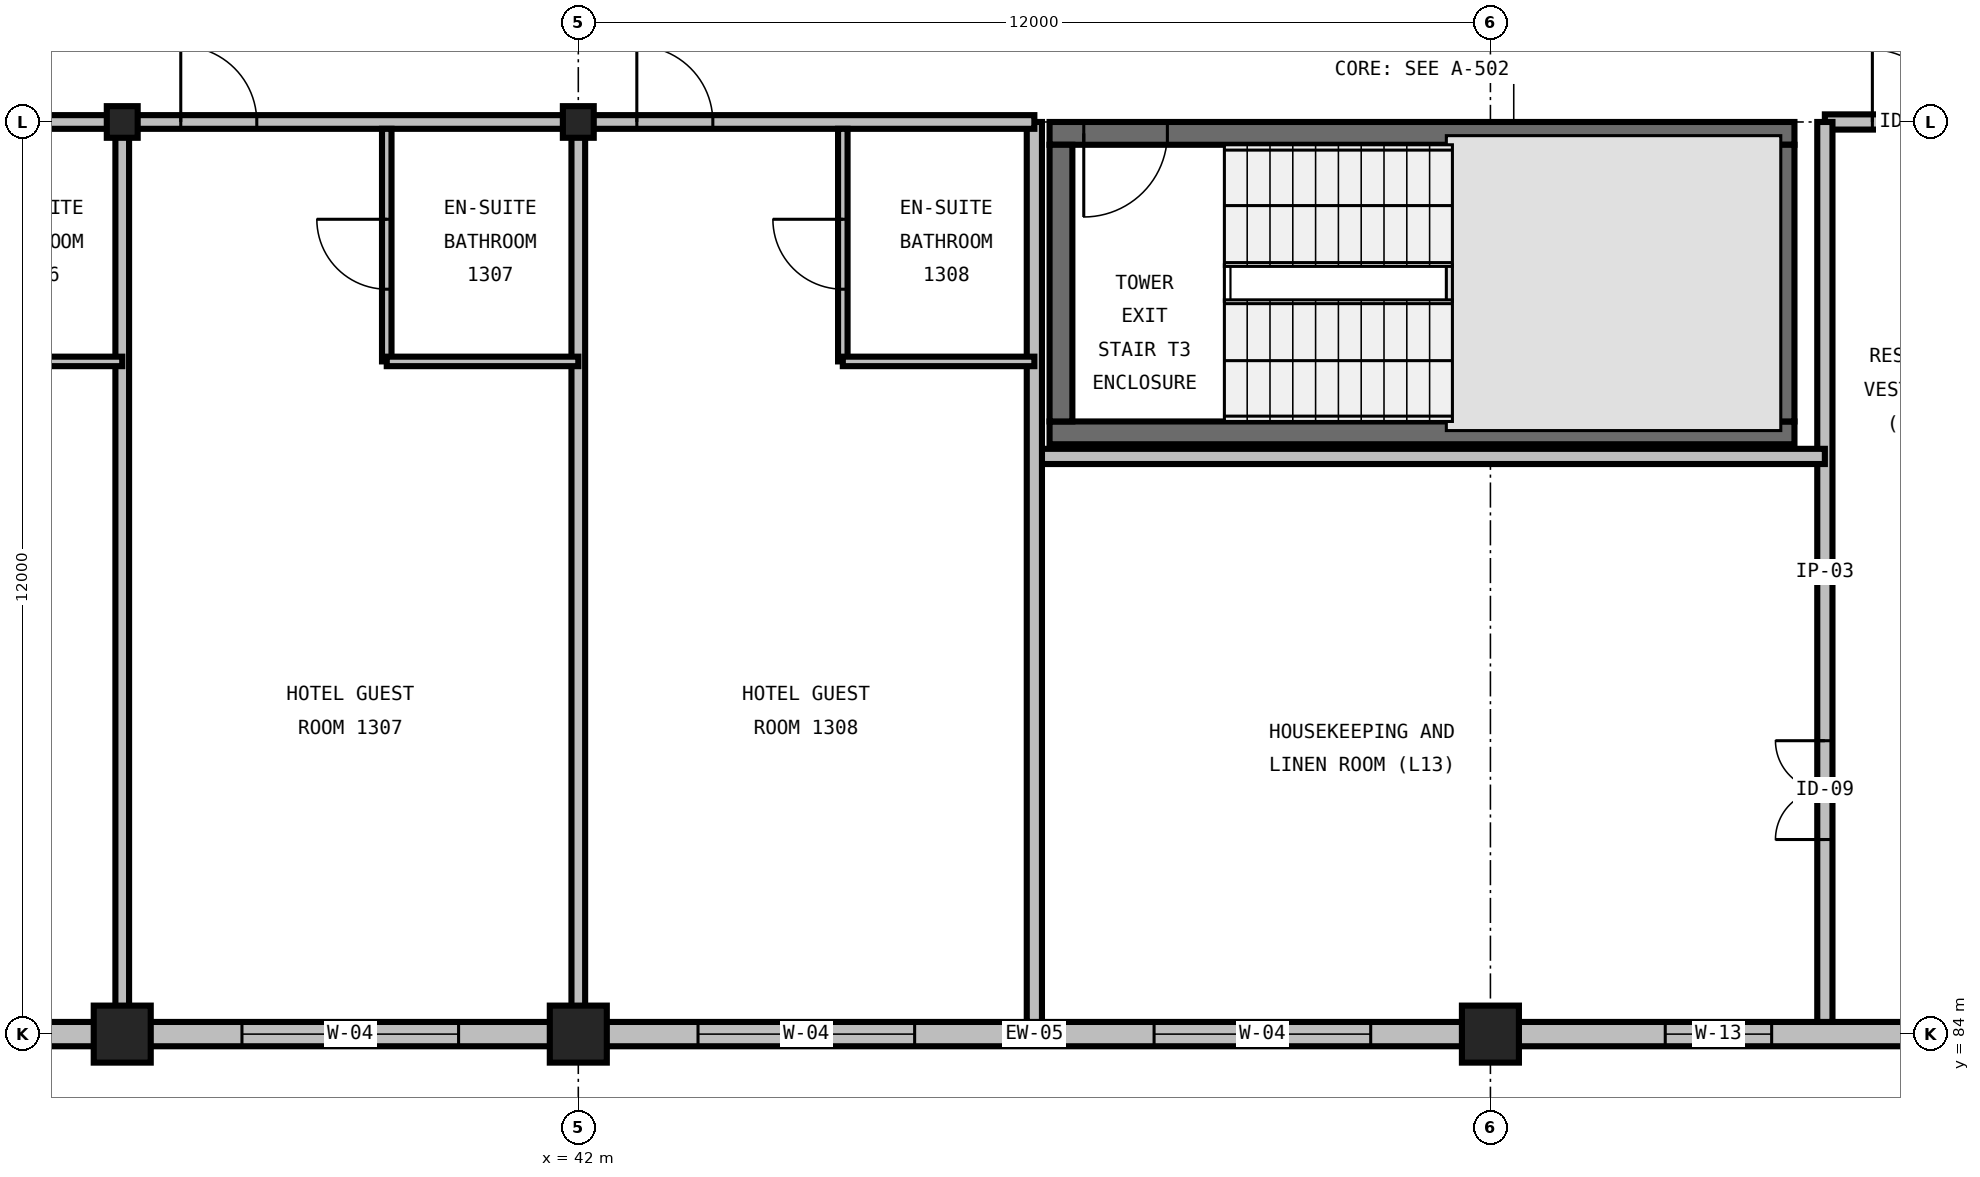
"""IFC4 building model, lengths in metres.
Left out: names, types, materials, properties, quantities, classifications, styles, units other than length and angle.
Written with IfcOpenShell. Run it as: python <this file> out.ifc"""

import sys

from ifc_helpers import new_model, si_unit, direction, frame, frame_2d, origin, origin_2d, place, context, subcontext, project, spatial, rectangle, i_section, extrude, element, fill, save


model = new_model("IFC4")
c1 = context("Model", 3, precision=1e-05, world=origin(), true_north=direction((0.0, 1.0)))
c2 = subcontext(c1, "Body", "Model", "MODEL_VIEW")
j1 = project(units=[si_unit("LENGTHUNIT", "METRE"), si_unit("PLANEANGLEUNIT", "RADIAN")], contexts=[c1])
p1 = place(None, origin())
s1 = spatial("IfcSite", under=j1, at=p1, CompositionType="ELEMENT")
p2 = place(p1, origin())
s2 = spatial("IfcBuilding", under=s1, at=p2, CompositionType="ELEMENT")
p3 = place(p2, frame((0.0, 0.0, 56.4)))
s3 = spatial("IfcBuildingStorey", under=s2, at=p3, CompositionType="ELEMENT", Elevation=56.4)
p4 = place(p3, frame((36.0, 84.0, 0.0), z_axis=(0.0, 0.0, 1.0), x_axis=(1.0, 0.0, 0.0)))
e1 = element("IfcColumn", 1, at=p4, inside=s3, PredefinedType="COLUMN", context=c2, shape_type="SweptSolid", body=[
    extrude(rectangle(XDim=0.75, YDim=0.75, at=origin_2d()), origin(), (0.0, 0.0, 1.0), 3.6),
])
p5 = place(p3, frame((36.0, 96.0, 0.0), z_axis=(0.0, 0.0, 1.0), x_axis=(1.0, 0.0, 0.0)))
e2 = element("IfcColumn", 2, at=p5, inside=s3, PredefinedType="COLUMN", context=c2, shape_type="SweptSolid", body=[
    extrude(i_section(OverallWidth=0.406, OverallDepth=0.416, WebThickness=0.03, FlangeThickness=0.048, FilletRadius=0.031, at=origin_2d()), origin(), (0.0, 0.0, 1.0), 3.6),
])
p6 = place(p3, frame((42.0, 84.0, 0.0), z_axis=(0.0, 0.0, 1.0), x_axis=(1.0, 0.0, 0.0)))
e3 = element("IfcColumn", 3, at=p6, inside=s3, PredefinedType="COLUMN", context=c2, shape_type="SweptSolid", body=[
    extrude(rectangle(XDim=0.75, YDim=0.75, at=origin_2d()), origin(), (0.0, 0.0, 1.0), 3.6),
])
p7 = place(p3, frame((42.0, 96.0, 0.0), z_axis=(0.0, 0.0, 1.0), x_axis=(1.0, 0.0, 0.0)))
e4 = element("IfcColumn", 4, at=p7, inside=s3, PredefinedType="COLUMN", context=c2, shape_type="SweptSolid", body=[
    extrude(i_section(OverallWidth=0.406, OverallDepth=0.416, WebThickness=0.03, FlangeThickness=0.048, FilletRadius=0.031, at=origin_2d()), origin(), (0.0, 0.0, 1.0), 3.6),
])
p8 = place(p3, frame((54.0, 84.0, 0.0), z_axis=(0.0, 0.0, 1.0), x_axis=(1.0, 0.0, 0.0)))
e5 = element("IfcColumn", 5, at=p8, inside=s3, PredefinedType="COLUMN", context=c2, shape_type="SweptSolid", body=[
    extrude(rectangle(XDim=0.75, YDim=0.75, at=origin_2d()), origin(), (0.0, 0.0, 1.0), 3.6),
])
p9 = place(p3, frame((48.2, 91.91, 0.0), z_axis=(0.0, 0.0, 1.0), x_axis=(1.0, 0.0, 0.0)))
e6 = element("IfcWall", 6, at=p9, inside=s3, PredefinedType="SHEAR", context=c2, shape_type="SweptSolid", body=[
    extrude(rectangle(XDim=9.8, YDim=0.3, at=frame_2d((4.9, 0.0))), origin(), (0.0, 0.0, 1.0), 3.6),
])
p10 = place(p3, frame((58.0, 95.85, 0.0), z_axis=(0.0, 0.0, 1.0), x_axis=(-1.0, 0.0, 0.0)))
e7 = element("IfcWall", 7, at=p10, inside=s3, PredefinedType="SHEAR", context=c2, shape_type="SweptSolid", body=[
    extrude(rectangle(XDim=9.8, YDim=0.3, at=frame_2d((4.9, 0.0))), origin(), (0.0, 0.0, 1.0), 3.6),
])
p11 = place(p10, frame((8.25, 0.0, 0.0)))
e8 = element("IfcOpeningElement", 8, at=p11, cuts=e7, PredefinedType="OPENING", context=c2, shape_type="SweptSolid", body=[
    extrude(rectangle(XDim=1.1, YDim=2.2, at=frame_2d((0.55, 1.1))), frame((0.0, 0.165, 0.0), z_axis=(0.0, -1.0, 0.0), x_axis=(1.0, 0.0, 0.0)), (0.0, 0.0, 1.0), 0.33),
])
for number, where, z_axis, x_axis in (
    (9, (48.35, 95.7, 0.0), (0.0, 0.0, 1.0), (0.0, -1.0, 0.0)),
    (10, (57.85, 92.06, 0.0), (0.0, 0.0, 1.0), (0.0, 1.0, 0.0)),
):
    element("IfcWall", number, at=place(p3, frame(where, z_axis=z_axis, x_axis=x_axis)), inside=s3, PredefinedType="SHEAR", context=c2, shape_type="SweptSolid", body=[
        extrude(rectangle(XDim=3.64, YDim=0.3, at=frame_2d((1.82, 0.0))), origin(), (0.0, 0.0, 1.0), 3.6),
    ])
p12 = place(p3, frame((30.0, 84.0, 0.0), z_axis=(0.0, 0.0, 1.0), x_axis=(1.0, 0.0, 0.0)))
e11 = element("IfcWall", 11, at=p12, inside=s3, PredefinedType="STANDARD", context=c2, shape_type="SweptSolid", body=[
    extrude(rectangle(XDim=6.0, YDim=0.32, at=frame_2d((3.0, 0.0))), origin(), (0.0, 0.0, 1.0), 2.536),
])
p13 = place(p12, frame((1.575, 0.0, 0.7)))
e12 = element("IfcOpeningElement", 12, at=p13, cuts=e11, PredefinedType="OPENING", context=c2, shape_type="SweptSolid", body=[
    extrude(rectangle(XDim=2.85, YDim=1.65, at=frame_2d((1.425, 0.825))), frame((0.0, 0.175, 0.0), z_axis=(0.0, -1.0, 0.0), x_axis=(1.0, 0.0, 0.0)), (0.0, 0.0, 1.0), 0.35),
])
p14 = place(p3, frame((36.0, 84.0, 0.0), z_axis=(0.0, 0.0, 1.0), x_axis=(1.0, 0.0, 0.0)))
e13 = element("IfcWall", 13, at=p14, inside=s3, PredefinedType="STANDARD", context=c2, shape_type="SweptSolid", body=[
    extrude(rectangle(XDim=6.0, YDim=0.32, at=frame_2d((3.0, 0.0))), origin(), (0.0, 0.0, 1.0), 2.536),
])
p15 = place(p14, frame((1.575, 0.0, 0.7)))
e14 = element("IfcOpeningElement", 14, at=p15, cuts=e13, PredefinedType="OPENING", context=c2, shape_type="SweptSolid", body=[
    extrude(rectangle(XDim=2.85, YDim=1.65, at=frame_2d((1.425, 0.825))), frame((0.0, 0.175, 0.0), z_axis=(0.0, -1.0, 0.0), x_axis=(1.0, 0.0, 0.0)), (0.0, 0.0, 1.0), 0.35),
])
p16 = place(p3, frame((42.0, 84.0, 0.0), z_axis=(0.0, 0.0, 1.0), x_axis=(1.0, 0.0, 0.0)))
e15 = element("IfcWall", 15, at=p16, inside=s3, PredefinedType="STANDARD", context=c2, shape_type="SweptSolid", body=[
    extrude(rectangle(XDim=12.0, YDim=0.32, at=frame_2d((6.0, 0.0))), origin(), (0.0, 0.0, 1.0), 2.536),
])
p17 = place(p16, frame((1.575, 0.0, 0.7)))
e16 = element("IfcOpeningElement", 16, at=p17, cuts=e15, PredefinedType="OPENING", context=c2, shape_type="SweptSolid", body=[
    extrude(rectangle(XDim=2.85, YDim=1.65, at=frame_2d((1.425, 0.825))), frame((0.0, 0.175, 0.0), z_axis=(0.0, -1.0, 0.0), x_axis=(1.0, 0.0, 0.0)), (0.0, 0.0, 1.0), 0.35),
])
p18 = place(p16, frame((7.575, 0.0, 0.7)))
e17 = element("IfcOpeningElement", 17, at=p18, cuts=e15, PredefinedType="OPENING", context=c2, shape_type="SweptSolid", body=[
    extrude(rectangle(XDim=2.85, YDim=1.65, at=frame_2d((1.425, 0.825))), frame((0.0, 0.175, 0.0), z_axis=(0.0, -1.0, 0.0), x_axis=(1.0, 0.0, 0.0)), (0.0, 0.0, 1.0), 0.35),
])
p19 = place(p3, frame((54.0, 84.0, 0.0), z_axis=(0.0, 0.0, 1.0), x_axis=(1.0, 0.0, 0.0)))
e18 = element("IfcWall", 18, at=p19, inside=s3, PredefinedType="STANDARD", context=c2, shape_type="SweptSolid", body=[
    extrude(rectangle(XDim=12.0, YDim=0.32, at=frame_2d((6.0, 0.0))), origin(), (0.0, 0.0, 1.0), 2.536),
])
p20 = place(p19, frame((2.3, 0.0, 1.0)))
e19 = element("IfcOpeningElement", 19, at=p20, cuts=e18, PredefinedType="OPENING", context=c2, shape_type="SweptSolid", body=[
    extrude(rectangle(XDim=1.4, YDim=1.4, at=frame_2d((0.7, 0.7))), frame((0.0, 0.175, 0.0), z_axis=(0.0, -1.0, 0.0), x_axis=(1.0, 0.0, 0.0)), (0.0, 0.0, 1.0), 0.35),
])
p21 = place(p19, frame((8.25, 0.0, 1.0)))
e20 = element("IfcOpeningElement", 20, at=p21, cuts=e18, PredefinedType="OPENING", context=c2, shape_type="SweptSolid", body=[
    extrude(rectangle(XDim=1.5, YDim=1.35, at=frame_2d((0.75, 0.675))), frame((0.0, 0.175, 0.0), z_axis=(0.0, -1.0, 0.0), x_axis=(1.0, 0.0, 0.0)), (0.0, 0.0, 1.0), 0.35),
])
p22 = place(p3, frame((58.4, 96.0, 0.0), z_axis=(0.0, 0.0, 1.0), x_axis=(1.0, 0.0, 0.0)))
e21 = element("IfcWall", 21, at=p22, inside=s3, PredefinedType="PARTITIONING", context=c2, shape_type="SweptSolid", body=[
    extrude(rectangle(XDim=2.4, YDim=0.2, at=frame_2d((1.2, 0.0))), origin(), (0.0, 0.0, 1.0), 2.359),
])
p23 = place(p22, frame((0.625, 0.0, 0.0)))
e22 = element("IfcOpeningElement", 22, at=p23, cuts=e21, PredefinedType="OPENING", context=c2, shape_type="SweptSolid", body=[
    extrude(rectangle(XDim=0.95, YDim=2.15, at=frame_2d((0.475, 1.075))), frame((0.0, 0.115, 0.0), z_axis=(0.0, -1.0, 0.0), x_axis=(1.0, 0.0, 0.0)), (0.0, 0.0, 1.0), 0.23),
])
p24 = place(p3, frame((58.4, 84.16, 0.0), z_axis=(0.0, 0.0, 1.0), x_axis=(0.0, 1.0, 0.0)))
e23 = element("IfcWall", 23, at=p24, inside=s3, PredefinedType="PARTITIONING", context=c2, shape_type="SweptSolid", body=[
    extrude(rectangle(XDim=11.84, YDim=0.2, at=frame_2d((5.92, 0.0))), origin(), (0.0, 0.0, 1.0), 3.29),
])
p25 = place(p24, frame((2.4, 0.0, 0.0)))
e24 = element("IfcOpeningElement", 24, at=p25, cuts=e23, PredefinedType="OPENING", context=c2, shape_type="SweptSolid", body=[
    extrude(rectangle(XDim=1.3, YDim=2.2, at=frame_2d((0.65, 1.1))), frame((0.0, 0.115, 0.0), z_axis=(0.0, -1.0, 0.0), x_axis=(1.0, 0.0, 0.0)), (0.0, 0.0, 1.0), 0.23),
])
p26 = place(p3, frame((48.0, 91.6, 0.0), z_axis=(0.0, 0.0, 1.0), x_axis=(1.0, 0.0, 0.0)))
e25 = element("IfcWall", 25, at=p26, inside=s3, PredefinedType="PARTITIONING", context=c2, shape_type="SweptSolid", body=[
    extrude(rectangle(XDim=10.4, YDim=0.2, at=frame_2d((5.2, 0.0))), origin(), (0.0, 0.0, 1.0), 3.29),
])
p27 = place(p3, frame((48.0, 84.16, 0.0), z_axis=(0.0, 0.0, 1.0), x_axis=(0.0, 1.0, 0.0)))
e26 = element("IfcWall", 26, at=p27, inside=s3, PredefinedType="PARTITIONING", context=c2, shape_type="SweptSolid", body=[
    extrude(rectangle(XDim=11.84, YDim=0.2, at=frame_2d((5.92, 0.0))), origin(), (0.0, 0.0, 1.0), 3.29),
])
p28 = place(p3, frame((30.085, 96.0, 0.0), z_axis=(0.0, 0.0, 1.0), x_axis=(1.0, 0.0, 0.0)))
e27 = element("IfcWall", 27, at=p28, inside=s3, PredefinedType="PARTITIONING", context=c2, shape_type="SweptSolid", body=[
    extrude(rectangle(XDim=5.915, YDim=0.18, at=frame_2d((2.957, 0.0))), origin(), (0.0, 0.0, 1.0), 2.736),
])
p29 = place(p28, frame((0.685, 0.0, 0.0)))
e28 = element("IfcOpeningElement", 28, at=p29, cuts=e27, PredefinedType="OPENING", context=c2, shape_type="SweptSolid", body=[
    extrude(rectangle(XDim=1.0, YDim=2.15, at=frame_2d((0.5, 1.075))), frame((0.0, 0.105, 0.0), z_axis=(0.0, -1.0, 0.0), x_axis=(1.0, 0.0, 0.0)), (0.0, 0.0, 1.0), 0.21),
])
p30 = place(p3, frame((36.0, 84.16, 0.0), z_axis=(0.0, 0.0, 1.0), x_axis=(0.0, 1.0, 0.0)))
e29 = element("IfcWall", 29, at=p30, inside=s3, PredefinedType="PARTITIONING", context=c2, shape_type="SweptSolid", body=[
    extrude(rectangle(XDim=11.84, YDim=0.18, at=frame_2d((5.92, 0.0))), origin(), (0.0, 0.0, 1.0), 2.59),
])
p31 = place(p3, frame((33.52, 92.85, 0.0), z_axis=(0.0, 0.0, 1.0), x_axis=(1.0, 0.0, 0.0)))
e30 = element("IfcWall", 30, at=p31, inside=s3, PredefinedType="PARTITIONING", context=c2, shape_type="SweptSolid", body=[
    extrude(rectangle(XDim=2.48, YDim=0.125, at=frame_2d((1.24, 0.0))), origin(), (0.0, 0.0, 1.0), 3.29),
])
p32 = place(p3, frame((36.0, 96.0, 0.0), z_axis=(0.0, 0.0, 1.0), x_axis=(1.0, 0.0, 0.0)))
e31 = element("IfcWall", 31, at=p32, inside=s3, PredefinedType="PARTITIONING", context=c2, shape_type="SweptSolid", body=[
    extrude(rectangle(XDim=6.0, YDim=0.18, at=frame_2d((3.0, 0.0))), origin(), (0.0, 0.0, 1.0), 2.736),
])
p33 = place(p32, frame((0.77, 0.0, 0.0)))
e32 = element("IfcOpeningElement", 32, at=p33, cuts=e31, PredefinedType="OPENING", context=c2, shape_type="SweptSolid", body=[
    extrude(rectangle(XDim=1.0, YDim=2.15, at=frame_2d((0.5, 1.075))), frame((0.0, 0.105, 0.0), z_axis=(0.0, -1.0, 0.0), x_axis=(1.0, 0.0, 0.0)), (0.0, 0.0, 1.0), 0.21),
])
p34 = place(p3, frame((42.0, 84.16, 0.0), z_axis=(0.0, 0.0, 1.0), x_axis=(0.0, 1.0, 0.0)))
e33 = element("IfcWall", 33, at=p34, inside=s3, PredefinedType="PARTITIONING", context=c2, shape_type="SweptSolid", body=[
    extrude(rectangle(XDim=11.84, YDim=0.18, at=frame_2d((5.92, 0.0))), origin(), (0.0, 0.0, 1.0), 2.59),
])
p35 = place(p3, frame((39.48, 92.85, 0.0), z_axis=(0.0, 0.0, 1.0), x_axis=(0.0, 1.0, 0.0)))
e34 = element("IfcWall", 34, at=p35, inside=s3, PredefinedType="PARTITIONING", context=c2, shape_type="SweptSolid", body=[
    extrude(rectangle(XDim=3.06, YDim=0.125, at=frame_2d((1.53, 0.0))), origin(), (0.0, 0.0, 1.0), 3.29),
])
p36 = place(p35, frame((0.95, 0.0, 0.0)))
e35 = element("IfcOpeningElement", 35, at=p36, cuts=e34, PredefinedType="OPENING", context=c2, shape_type="SweptSolid", body=[
    extrude(rectangle(XDim=0.92, YDim=2.1, at=frame_2d((0.46, 1.05))), frame((0.0, 0.077, 0.0), z_axis=(0.0, -1.0, 0.0), x_axis=(1.0, 0.0, 0.0)), (0.0, 0.0, 1.0), 0.155),
])
p37 = place(p3, frame((39.48, 92.85, 0.0), z_axis=(0.0, 0.0, 1.0), x_axis=(1.0, 0.0, 0.0)))
e36 = element("IfcWall", 36, at=p37, inside=s3, PredefinedType="PARTITIONING", context=c2, shape_type="SweptSolid", body=[
    extrude(rectangle(XDim=2.52, YDim=0.125, at=frame_2d((1.26, 0.0))), origin(), (0.0, 0.0, 1.0), 3.29),
])
p38 = place(p3, frame((42.0, 96.0, 0.0), z_axis=(0.0, 0.0, 1.0), x_axis=(1.0, 0.0, 0.0)))
e37 = element("IfcWall", 37, at=p38, inside=s3, PredefinedType="PARTITIONING", context=c2, shape_type="SweptSolid", body=[
    extrude(rectangle(XDim=6.0, YDim=0.18, at=frame_2d((3.0, 0.0))), origin(), (0.0, 0.0, 1.0), 2.359),
])
p39 = place(p38, frame((0.77, 0.0, 0.0)))
e38 = element("IfcOpeningElement", 38, at=p39, cuts=e37, PredefinedType="OPENING", context=c2, shape_type="SweptSolid", body=[
    extrude(rectangle(XDim=1.0, YDim=2.15, at=frame_2d((0.5, 1.075))), frame((0.0, 0.105, 0.0), z_axis=(0.0, -1.0, 0.0), x_axis=(1.0, 0.0, 0.0)), (0.0, 0.0, 1.0), 0.21),
])
p40 = place(p3, frame((45.48, 92.85, 0.0), z_axis=(0.0, 0.0, 1.0), x_axis=(0.0, 1.0, 0.0)))
e39 = element("IfcWall", 39, at=p40, inside=s3, PredefinedType="PARTITIONING", context=c2, shape_type="SweptSolid", body=[
    extrude(rectangle(XDim=3.06, YDim=0.125, at=frame_2d((1.53, 0.0))), origin(), (0.0, 0.0, 1.0), 3.29),
])
p41 = place(p40, frame((0.95, 0.0, 0.0)))
e40 = element("IfcOpeningElement", 40, at=p41, cuts=e39, PredefinedType="OPENING", context=c2, shape_type="SweptSolid", body=[
    extrude(rectangle(XDim=0.92, YDim=2.1, at=frame_2d((0.46, 1.05))), frame((0.0, 0.077, 0.0), z_axis=(0.0, -1.0, 0.0), x_axis=(1.0, 0.0, 0.0)), (0.0, 0.0, 1.0), 0.155),
])
p42 = place(p3, frame((45.48, 92.85, 0.0), z_axis=(0.0, 0.0, 1.0), x_axis=(1.0, 0.0, 0.0)))
e41 = element("IfcWall", 41, at=p42, inside=s3, PredefinedType="PARTITIONING", context=c2, shape_type="SweptSolid", body=[
    extrude(rectangle(XDim=2.52, YDim=0.125, at=frame_2d((1.26, 0.0))), origin(), (0.0, 0.0, 1.0), 3.29),
])
p43 = place(p11, origin())
e42 = element("IfcDoor", 42, at=p43, inside=s3, OperationType="SINGLE_SWING_RIGHT", PredefinedType="DOOR", context=c2, shape_type="SweptSolid", body=[
    extrude(rectangle(XDim=1.1, YDim=2.2, at=frame_2d((0.55, 1.1))), frame((0.0, 0.025, 0.0), z_axis=(0.0, -1.0, 0.0), x_axis=(1.0, 0.0, 0.0)), (0.0, 0.0, 1.0), 0.05),
])
fill(e8, e42)
p44 = place(p15, origin())
e43 = element("IfcWindow", 43, at=p44, inside=s3, PartitioningType="TRIPLE_PANEL_VERTICAL", PredefinedType="WINDOW", context=c2, shape_type="SweptSolid", body=[
    extrude(rectangle(XDim=2.85, YDim=1.65, at=frame_2d((1.425, 0.825))), frame((0.0, 0.03, 0.0), z_axis=(0.0, -1.0, 0.0), x_axis=(1.0, 0.0, 0.0)), (0.0, 0.0, 1.0), 0.06),
])
fill(e14, e43)
p45 = place(p17, origin())
e44 = element("IfcWindow", 44, at=p45, inside=s3, PartitioningType="TRIPLE_PANEL_VERTICAL", PredefinedType="WINDOW", context=c2, shape_type="SweptSolid", body=[
    extrude(rectangle(XDim=2.85, YDim=1.65, at=frame_2d((1.425, 0.825))), frame((0.0, 0.03, 0.0), z_axis=(0.0, -1.0, 0.0), x_axis=(1.0, 0.0, 0.0)), (0.0, 0.0, 1.0), 0.06),
])
fill(e16, e44)
p46 = place(p18, origin())
e45 = element("IfcWindow", 45, at=p46, inside=s3, PartitioningType="TRIPLE_PANEL_VERTICAL", PredefinedType="WINDOW", context=c2, shape_type="SweptSolid", body=[
    extrude(rectangle(XDim=2.85, YDim=1.65, at=frame_2d((1.425, 0.825))), frame((0.0, 0.03, 0.0), z_axis=(0.0, -1.0, 0.0), x_axis=(1.0, 0.0, 0.0)), (0.0, 0.0, 1.0), 0.06),
])
fill(e17, e45)
p47 = place(p20, origin())
e46 = element("IfcWindow", 46, at=p47, inside=s3, PartitioningType="SINGLE_PANEL", PredefinedType="WINDOW", context=c2, shape_type="SweptSolid", body=[
    extrude(rectangle(XDim=1.4, YDim=1.4, at=frame_2d((0.7, 0.7))), frame((0.0, 0.03, 0.0), z_axis=(0.0, -1.0, 0.0), x_axis=(1.0, 0.0, 0.0)), (0.0, 0.0, 1.0), 0.06),
])
fill(e19, e46)
p48 = place(p23, origin())
e47 = element("IfcDoor", 47, at=p48, inside=s3, OperationType="SINGLE_SWING_LEFT", PredefinedType="DOOR", context=c2, shape_type="SweptSolid", body=[
    extrude(rectangle(XDim=0.95, YDim=2.15, at=frame_2d((0.475, 1.075))), frame((0.0, 0.025, 0.0), z_axis=(0.0, -1.0, 0.0), x_axis=(1.0, 0.0, 0.0)), (0.0, 0.0, 1.0), 0.05),
])
fill(e22, e47)
p49 = place(p25, origin())
e48 = element("IfcDoor", 48, at=p49, inside=s3, OperationType="DOUBLE_DOOR_SINGLE_SWING", PredefinedType="DOOR", context=c2, shape_type="SweptSolid", body=[
    extrude(rectangle(XDim=1.3, YDim=2.2, at=frame_2d((0.65, 1.1))), frame((0.0, 0.025, 0.0), z_axis=(0.0, -1.0, 0.0), x_axis=(1.0, 0.0, 0.0)), (0.0, 0.0, 1.0), 0.05),
])
fill(e24, e48)
p50 = place(p33, origin())
e49 = element("IfcDoor", 49, at=p50, inside=s3, OperationType="SINGLE_SWING_LEFT", PredefinedType="DOOR", context=c2, shape_type="SweptSolid", body=[
    extrude(rectangle(XDim=1.0, YDim=2.15, at=frame_2d((0.5, 1.075))), frame((0.0, 0.025, 0.0), z_axis=(0.0, -1.0, 0.0), x_axis=(1.0, 0.0, 0.0)), (0.0, 0.0, 1.0), 0.05),
])
fill(e32, e49)
p51 = place(p36, origin())
e50 = element("IfcDoor", 50, at=p51, inside=s3, OperationType="SINGLE_SWING_RIGHT", PredefinedType="DOOR", context=c2, shape_type="SweptSolid", body=[
    extrude(rectangle(XDim=0.92, YDim=2.1, at=frame_2d((0.46, 1.05))), frame((0.0, 0.025, 0.0), z_axis=(0.0, -1.0, 0.0), x_axis=(1.0, 0.0, 0.0)), (0.0, 0.0, 1.0), 0.05),
])
fill(e35, e50)
p52 = place(p39, origin())
e51 = element("IfcDoor", 51, at=p52, inside=s3, OperationType="SINGLE_SWING_LEFT", PredefinedType="DOOR", context=c2, shape_type="SweptSolid", body=[
    extrude(rectangle(XDim=1.0, YDim=2.15, at=frame_2d((0.5, 1.075))), frame((0.0, 0.025, 0.0), z_axis=(0.0, -1.0, 0.0), x_axis=(1.0, 0.0, 0.0)), (0.0, 0.0, 1.0), 0.05),
])
fill(e38, e51)
p53 = place(p41, origin())
e52 = element("IfcDoor", 52, at=p53, inside=s3, OperationType="SINGLE_SWING_RIGHT", PredefinedType="DOOR", context=c2, shape_type="SweptSolid", body=[
    extrude(rectangle(XDim=0.92, YDim=2.1, at=frame_2d((0.46, 1.05))), frame((0.0, 0.025, 0.0), z_axis=(0.0, -1.0, 0.0), x_axis=(1.0, 0.0, 0.0)), (0.0, 0.0, 1.0), 0.05),
])
fill(e40, e52)
save(model, sys.argv[1])
